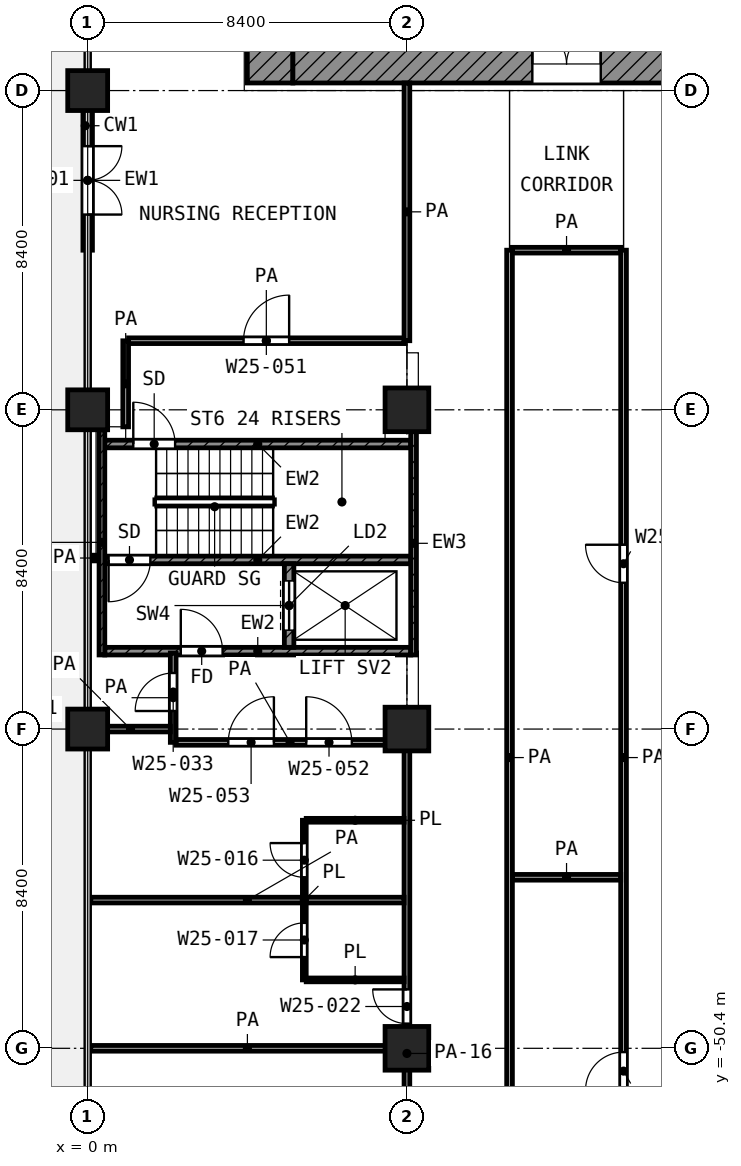
"""IFC4 building model, lengths in metres.
Left out: names, types, materials, properties, quantities, classifications, styles, units other than length and angle.
Written with IfcOpenShell. Run it as: python <this file> out.ifc"""

import sys

from ifc_helpers import new_model, si_unit, direction, frame, frame_2d, origin, origin_2d, place, context, subcontext, project, spatial, rectangle, extrude, element, fill, save


model = new_model("IFC4")
c1 = context("Model", 3, precision=1e-05, world=origin(), true_north=direction((0.0, 1.0)))
c2 = subcontext(c1, "Body", "Model", "MODEL_VIEW")
j1 = project(units=[si_unit("LENGTHUNIT", "METRE"), si_unit("PLANEANGLEUNIT", "RADIAN")], contexts=[c1])
p1 = place(None, origin())
s1 = spatial("IfcSite", under=j1, at=p1, CompositionType="ELEMENT")
p2 = place(p1, origin())
s2 = spatial("IfcBuilding", under=s1, at=p2, CompositionType="ELEMENT")
p3 = place(p2, frame((0.0, 0.0, 111.4)))
s3 = spatial("IfcBuildingStorey", under=s2, at=p3, CompositionType="ELEMENT", Elevation=111.4)
for number, where, z_axis, x_axis in (
    (1, (0.0, -25.2, 0.0), (0.0, 0.0, 1.0), (1.0, 0.0, 0.0)),
    (2, (0.0, -33.6, 0.0), (0.0, 0.0, 1.0), (1.0, 0.0, 0.0)),
):
    element("IfcColumn", number, at=place(p3, frame(where, z_axis=z_axis, x_axis=x_axis)), inside=s3, PredefinedType="COLUMN", context=c2, shape_type="SweptSolid", body=[
        extrude(rectangle(XDim=1.05, YDim=1.05, at=origin_2d()), origin(), (0.0, 0.0, 1.0), 4.2),
    ])
p4 = place(p3, frame((8.4, -33.6, 0.0), z_axis=(0.0, 0.0, 1.0), x_axis=(1.0, 0.0, 0.0)))
e3 = element("IfcColumn", 3, at=p4, inside=s3, PredefinedType="COLUMN", context=c2, shape_type="SweptSolid", body=[
    extrude(rectangle(XDim=1.15, YDim=1.15, at=origin_2d()), origin(), (0.0, 0.0, 1.0), 4.2),
])
p5 = place(p3, frame((0.0, -42.0, 0.0), z_axis=(0.0, 0.0, 1.0), x_axis=(1.0, 0.0, 0.0)))
e4 = element("IfcColumn", 4, at=p5, inside=s3, PredefinedType="COLUMN", context=c2, shape_type="SweptSolid", body=[
    extrude(rectangle(XDim=1.05, YDim=1.05, at=origin_2d()), origin(), (0.0, 0.0, 1.0), 4.2),
])
for number, where, z_axis, x_axis in (
    (5, (8.4, -42.0, 0.0), (0.0, 0.0, 1.0), (1.0, 0.0, 0.0)),
    (6, (8.4, -50.4, 0.0), (0.0, 0.0, 1.0), (1.0, 0.0, 0.0)),
):
    element("IfcColumn", number, at=place(p3, frame(where, z_axis=z_axis, x_axis=x_axis)), inside=s3, PredefinedType="COLUMN", context=c2, shape_type="SweptSolid", body=[
        extrude(rectangle(XDim=1.15, YDim=1.15, at=origin_2d()), origin(), (0.0, 0.0, 1.0), 4.2),
    ])
p6 = place(p3, frame((0.0, -25.725, 0.0), z_axis=(0.0, 0.0, 1.0), x_axis=(0.0, -1.0, 0.0)))
e7 = element("IfcWall", 7, at=p6, inside=s3, PredefinedType="SOLIDWALL", context=c2, shape_type="SweptSolid", body=[
    extrude(rectangle(XDim=3.675, YDim=0.25, at=frame_2d((1.837, 0.0))), origin(), (0.0, 0.0, 1.0), 3.48),
])
p7 = place(p6, frame((0.938, 0.0, 0.0)))
e8 = element("IfcOpeningElement", 8, at=p7, cuts=e7, PredefinedType="OPENING", context=c2, shape_type="SweptSolid", body=[
    extrude(rectangle(XDim=1.8, YDim=2.1, at=frame_2d((0.9, 1.05))), frame((0.0, 0.135, 0.0), z_axis=(0.0, -1.0, 0.0), x_axis=(1.0, 0.0, 0.0)), (0.0, 0.0, 1.0), 0.27),
])
p8 = place(p3, frame((4.8, -25.0, 0.0), z_axis=(0.0, 0.0, 1.0), x_axis=(0.0, 1.0, 0.0)))
e9 = element("IfcWall", 9, at=p8, inside=s3, PredefinedType="SHEAR", context=c2, shape_type="SweptSolid", body=[
    extrude(rectangle(XDim=19.6, YDim=1.2, at=frame_2d((9.8, 0.0))), origin(), (0.0, 0.0, 1.0), 3.6),
])
p9 = place(p8, frame((11.45, 0.0, 0.0)))
e10 = element("IfcOpeningElement", 10, at=p9, cuts=e9, PredefinedType="OPENING", context=c2, shape_type="SweptSolid", body=[
    extrude(rectangle(XDim=1.1, YDim=2.1, at=frame_2d((0.55, 1.05))), frame((0.0, 0.61, 0.0), z_axis=(0.0, -1.0, 0.0), x_axis=(1.0, 0.0, 0.0)), (0.0, 0.0, 1.0), 1.22),
])
p10 = place(p8, frame((2.15, 0.0, 0.0)))
e11 = element("IfcOpeningElement", 11, at=p10, cuts=e9, PredefinedType="OPENING", context=c2, shape_type="SweptSolid", body=[
    extrude(rectangle(XDim=1.1, YDim=2.1, at=frame_2d((0.55, 1.05))), frame((0.0, 0.61, 0.0), z_axis=(0.0, -1.0, 0.0), x_axis=(1.0, 0.0, 0.0)), (0.0, 0.0, 1.0), 1.22),
])
p11 = place(p3, frame((5.4, -24.5, 0.0), z_axis=(0.0, 0.0, 1.0), x_axis=(1.0, 0.0, 0.0)))
e12 = element("IfcWall", 12, at=p11, inside=s3, PredefinedType="SHEAR", context=c2, shape_type="SweptSolid", body=[
    extrude(rectangle(XDim=18.6, YDim=1.0, at=frame_2d((9.3, 0.0))), origin(), (0.0, 0.0, 1.0), 3.6),
])
p12 = place(p11, frame((6.3, 0.0, 0.0)))
e13 = element("IfcOpeningElement", 13, at=p12, cuts=e12, PredefinedType="OPENING", context=c2, shape_type="SweptSolid", body=[
    extrude(rectangle(XDim=1.8, YDim=2.1, at=frame_2d((0.9, 1.05))), frame((0.0, 0.51, 0.0), z_axis=(0.0, -1.0, 0.0), x_axis=(1.0, 0.0, 0.0)), (0.0, 0.0, 1.0), 1.02),
])
p13 = place(p3, frame((0.375, -40.05, 0.0), z_axis=(0.0, 0.0, 1.0), x_axis=(0.0, 1.0, 0.0)))
e14 = element("IfcWall", 14, at=p13, inside=s3, PredefinedType="SHEAR", context=c2, shape_type="SweptSolid", body=[
    extrude(rectangle(XDim=5.925, YDim=0.15, at=frame_2d((2.962, 0.0))), origin(), (0.0, 0.0, 1.0), 3.6),
])
p14 = place(p3, frame((8.575, -40.05, 0.0), z_axis=(0.0, 0.0, 1.0), x_axis=(0.0, 1.0, 0.0)))
e15 = element("IfcWall", 15, at=p14, inside=s3, PredefinedType="SHEAR", context=c2, shape_type="SweptSolid", body=[
    extrude(rectangle(XDim=5.875, YDim=0.15, at=frame_2d((2.938, 0.0))), origin(), (0.0, 0.0, 1.0), 3.6),
])
p15 = place(p3, frame((0.45, -34.5, 0.0), z_axis=(0.0, 0.0, 1.0), x_axis=(1.0, 0.0, 0.0)))
e16 = element("IfcWall", 16, at=p15, inside=s3, PredefinedType="SHEAR", context=c2, shape_type="SweptSolid", body=[
    extrude(rectangle(XDim=8.05, YDim=0.2, at=frame_2d((4.025, 0.0))), origin(), (0.0, 0.0, 1.0), 3.6),
])
p16 = place(p15, frame((0.75, 0.0, 0.0)))
e17 = element("IfcOpeningElement", 17, at=p16, cuts=e16, PredefinedType="OPENING", context=c2, shape_type="SweptSolid", body=[
    extrude(rectangle(XDim=1.1, YDim=2.1, at=frame_2d((0.55, 1.05))), frame((0.0, 0.11, 0.0), z_axis=(0.0, -1.0, 0.0), x_axis=(1.0, 0.0, 0.0)), (0.0, 0.0, 1.0), 0.22),
])
p17 = place(p3, frame((0.45, -37.55, 0.0), z_axis=(0.0, 0.0, 1.0), x_axis=(1.0, 0.0, 0.0)))
e18 = element("IfcWall", 18, at=p17, inside=s3, PredefinedType="SHEAR", context=c2, shape_type="SweptSolid", body=[
    extrude(rectangle(XDim=8.05, YDim=0.2, at=frame_2d((4.025, 0.0))), origin(), (0.0, 0.0, 1.0), 3.6),
])
p18 = place(p17, frame((0.1, 0.0, 0.0)))
e19 = element("IfcOpeningElement", 19, at=p18, cuts=e18, PredefinedType="OPENING", context=c2, shape_type="SweptSolid", body=[
    extrude(rectangle(XDim=1.1, YDim=2.1, at=frame_2d((0.55, 1.05))), frame((0.0, 0.11, 0.0), z_axis=(0.0, -1.0, 0.0), x_axis=(1.0, 0.0, 0.0)), (0.0, 0.0, 1.0), 0.22),
])
p19 = place(p3, frame((0.45, -39.95, 0.0), z_axis=(0.0, 0.0, 1.0), x_axis=(1.0, 0.0, 0.0)))
e20 = element("IfcWall", 20, at=p19, inside=s3, PredefinedType="SHEAR", context=c2, shape_type="SweptSolid", body=[
    extrude(rectangle(XDim=8.05, YDim=0.2, at=frame_2d((4.025, 0.0))), origin(), (0.0, 0.0, 1.0), 3.6),
])
p20 = place(p19, frame((2.0, 0.0, 0.0)))
e21 = element("IfcOpeningElement", 21, at=p20, cuts=e20, PredefinedType="OPENING", context=c2, shape_type="SweptSolid", body=[
    extrude(rectangle(XDim=1.1, YDim=2.1, at=frame_2d((0.55, 1.05))), frame((0.0, 0.11, 0.0), z_axis=(0.0, -1.0, 0.0), x_axis=(1.0, 0.0, 0.0)), (0.0, 0.0, 1.0), 0.22),
])
p21 = place(p3, frame((5.3, -39.85, 0.0), z_axis=(0.0, 0.0, 1.0), x_axis=(0.0, 1.0, 0.0)))
e22 = element("IfcWall", 22, at=p21, inside=s3, PredefinedType="SHEAR", context=c2, shape_type="SweptSolid", body=[
    extrude(rectangle(XDim=2.2, YDim=0.25, at=frame_2d((1.1, 0.0))), origin(), (0.0, 0.0, 1.0), 3.6),
])
p22 = place(p21, frame((0.45, 0.0, 0.0)))
e23 = element("IfcOpeningElement", 23, at=p22, cuts=e22, PredefinedType="OPENING", context=c2, shape_type="SweptSolid", body=[
    extrude(rectangle(XDim=1.3, YDim=2.1, at=frame_2d((0.65, 1.05))), frame((0.0, 0.135, 0.0), z_axis=(0.0, -1.0, 0.0), x_axis=(1.0, 0.0, 0.0)), (0.0, 0.0, 1.0), 0.27),
])
for number, where, z_axis, x_axis in (
    (24, (5.75, -48.6, 0.0), (0.0, 0.0, 1.0), (1.0, 0.0, 0.0)),
    (25, (5.75, -44.4, 0.0), (0.0, 0.0, 1.0), (1.0, 0.0, 0.0)),
):
    element("IfcWall", number, at=place(p3, frame(where, z_axis=z_axis, x_axis=x_axis)), inside=s3, PredefinedType="PARTITIONING", context=c2, shape_type="SweptSolid", body=[
        extrude(rectangle(XDim=2.575, YDim=0.1, at=frame_2d((1.288, 0.0))), origin(), (0.0, 0.0, 1.0), 3.6),
    ])
p23 = place(p3, frame((5.7, -48.6, 0.0), z_axis=(0.0, 0.0, 1.0), x_axis=(0.0, 1.0, 0.0)))
e26 = element("IfcWall", 26, at=p23, inside=s3, PredefinedType="PARTITIONING", context=c2, shape_type="SweptSolid", body=[
    extrude(rectangle(XDim=4.2, YDim=0.1, at=frame_2d((2.1, 0.0))), origin(), (0.0, 0.0, 1.0), 3.6),
])
p24 = place(p23, frame((2.7, 0.0, 0.0)))
e27 = element("IfcOpeningElement", 27, at=p24, cuts=e26, PredefinedType="OPENING", context=c2, shape_type="SweptSolid", body=[
    extrude(rectangle(XDim=0.9, YDim=2.1, at=frame_2d((0.45, 1.05))), frame((0.0, 0.06, 0.0), z_axis=(0.0, -1.0, 0.0), x_axis=(1.0, 0.0, 0.0)), (0.0, 0.0, 1.0), 0.12),
])
p25 = place(p23, frame((0.6, 0.0, 0.0)))
e28 = element("IfcOpeningElement", 28, at=p25, cuts=e26, PredefinedType="OPENING", context=c2, shape_type="SweptSolid", body=[
    extrude(rectangle(XDim=0.9, YDim=2.1, at=frame_2d((0.45, 1.05))), frame((0.0, 0.06, 0.0), z_axis=(0.0, -1.0, 0.0), x_axis=(1.0, 0.0, 0.0)), (0.0, 0.0, 1.0), 0.12),
])
for number, where, z_axis, x_axis in (
    (29, (0.08, -50.4, 0.0), (0.0, 0.0, 1.0), (1.0, 0.0, 0.0)),
    (30, (0.08, -46.5, 0.0), (0.0, 0.0, 1.0), (1.0, 0.0, 0.0)),
):
    element("IfcWall", number, at=place(p3, frame(where, z_axis=z_axis, x_axis=x_axis)), inside=s3, PredefinedType="PARTITIONING", context=c2, shape_type="SweptSolid", body=[
        extrude(rectangle(XDim=8.245, YDim=0.15, at=frame_2d((4.123, 0.0))), origin(), (0.0, 0.0, 1.0), 3.6),
    ])
p26 = place(p3, frame((11.175, -45.9, 0.0), z_axis=(0.0, 0.0, 1.0), x_axis=(1.0, 0.0, 0.0)))
e31 = element("IfcWall", 31, at=p26, inside=s3, PredefinedType="PARTITIONING", context=c2, shape_type="SweptSolid", body=[
    extrude(rectangle(XDim=2.85, YDim=0.15, at=frame_2d((1.425, 0.0))), origin(), (0.0, 0.0, 1.0), 3.6),
])
p27 = place(p3, frame((2.325, -42.35, 0.0), z_axis=(0.0, 0.0, 1.0), x_axis=(1.0, 0.0, 0.0)))
e32 = element("IfcWall", 32, at=p27, inside=s3, PredefinedType="PARTITIONING", context=c2, shape_type="SweptSolid", body=[
    extrude(rectangle(XDim=6.0, YDim=0.15, at=frame_2d((3.0, 0.0))), origin(), (0.0, 0.0, 1.0), 3.6),
])
p28 = place(p27, frame((3.425, 0.0, 0.0)))
e33 = element("IfcOpeningElement", 33, at=p28, cuts=e32, PredefinedType="OPENING", context=c2, shape_type="SweptSolid", body=[
    extrude(rectangle(XDim=1.2, YDim=2.1, at=frame_2d((0.6, 1.05))), frame((0.0, 0.085, 0.0), z_axis=(0.0, -1.0, 0.0), x_axis=(1.0, 0.0, 0.0)), (0.0, 0.0, 1.0), 0.17),
])
p29 = place(p27, frame((1.375, 0.0, 0.0)))
e34 = element("IfcOpeningElement", 34, at=p29, cuts=e32, PredefinedType="OPENING", context=c2, shape_type="SweptSolid", body=[
    extrude(rectangle(XDim=1.2, YDim=2.1, at=frame_2d((0.6, 1.05))), frame((0.0, 0.085, 0.0), z_axis=(0.0, -1.0, 0.0), x_axis=(1.0, 0.0, 0.0)), (0.0, 0.0, 1.0), 0.17),
])
p30 = place(p3, frame((0.08, -42.0, 0.0), z_axis=(0.0, 0.0, 1.0), x_axis=(1.0, 0.0, 0.0)))
e35 = element("IfcWall", 35, at=p30, inside=s3, PredefinedType="PARTITIONING", context=c2, shape_type="SweptSolid", body=[
    extrude(rectangle(XDim=2.095, YDim=0.15, at=frame_2d((1.047, 0.0))), origin(), (0.0, 0.0, 1.0), 3.6),
])
p31 = place(p3, frame((0.08, -37.5, 0.0), z_axis=(0.0, 0.0, 1.0), x_axis=(1.0, 0.0, 0.0)))
e36 = element("IfcWall", 36, at=p31, inside=s3, PredefinedType="PARTITIONING", context=c2, shape_type="SweptSolid", body=[
    extrude(rectangle(XDim=0.19, YDim=0.15, at=frame_2d((0.095, 0.0))), origin(), (0.0, 0.0, 1.0), 3.6),
])
p32 = place(p3, frame((1.076, -31.782, 0.0), z_axis=(0.0, 0.0, 1.0), x_axis=(1.0, 0.0, 0.0)))
e37 = element("IfcWall", 37, at=p32, inside=s3, PredefinedType="PARTITIONING", context=c2, shape_type="SweptSolid", body=[
    extrude(rectangle(XDim=7.249, YDim=0.15, at=frame_2d((3.625, 0.0))), origin(), (0.0, 0.0, 1.0), 3.6),
])
p33 = place(p32, frame((3.025, 0.0, 0.0)))
e38 = element("IfcOpeningElement", 38, at=p33, cuts=e37, PredefinedType="OPENING", context=c2, shape_type="SweptSolid", body=[
    extrude(rectangle(XDim=1.2, YDim=2.1, at=frame_2d((0.6, 1.05))), frame((0.0, 0.085, 0.0), z_axis=(0.0, -1.0, 0.0), x_axis=(1.0, 0.0, 0.0)), (0.0, 0.0, 1.0), 0.17),
])
p34 = place(p3, frame((11.175, -29.4, 0.0), z_axis=(0.0, 0.0, 1.0), x_axis=(1.0, 0.0, 0.0)))
e39 = element("IfcWall", 39, at=p34, inside=s3, PredefinedType="PARTITIONING", context=c2, shape_type="SweptSolid", body=[
    extrude(rectangle(XDim=2.85, YDim=0.15, at=frame_2d((1.425, 0.0))), origin(), (0.0, 0.0, 1.0), 3.6),
])
p35 = place(p3, frame((1.0, -34.048, 0.0), z_axis=(0.0, 0.0, 1.0), x_axis=(0.0, 1.0, 0.0)))
e40 = element("IfcWall", 40, at=p35, inside=s3, PredefinedType="PARTITIONING", context=c2, shape_type="SweptSolid", body=[
    extrude(rectangle(XDim=2.264, YDim=0.15, at=frame_2d((1.132, 0.0))), origin(), (0.0, 0.0, 1.0), 3.6),
])
p36 = place(p3, frame((2.25, -42.35, 0.0), z_axis=(0.0, 0.0, 1.0), x_axis=(0.0, 1.0, 0.0)))
e41 = element("IfcWall", 41, at=p36, inside=s3, PredefinedType="PARTITIONING", context=c2, shape_type="SweptSolid", body=[
    extrude(rectangle(XDim=2.35, YDim=0.15, at=frame_2d((1.175, 0.0))), origin(), (0.0, 0.0, 1.0), 3.6),
])
p37 = place(p36, frame((0.825, 0.0, 0.0)))
e42 = element("IfcOpeningElement", 42, at=p37, cuts=e41, PredefinedType="OPENING", context=c2, shape_type="SweptSolid", body=[
    extrude(rectangle(XDim=1.0, YDim=2.1, at=frame_2d((0.5, 1.05))), frame((0.0, 0.085, 0.0), z_axis=(0.0, -1.0, 0.0), x_axis=(1.0, 0.0, 0.0)), (0.0, 0.0, 1.0), 0.17),
])
p38 = place(p3, frame((8.4, -58.72, 0.0), z_axis=(0.0, 0.0, 1.0), x_axis=(0.0, 1.0, 0.0)))
e43 = element("IfcWall", 43, at=p38, inside=s3, PredefinedType="PARTITIONING", context=c2, shape_type="SweptSolid", body=[
    extrude(rectangle(XDim=16.37, YDim=0.15, at=frame_2d((8.185, 0.0))), origin(), (0.0, 0.0, 1.0), 2.7),
])
p39 = place(p38, frame((8.97, 0.0, 0.0)))
e44 = element("IfcOpeningElement", 44, at=p39, cuts=e43, PredefinedType="OPENING", context=c2, shape_type="SweptSolid", body=[
    extrude(rectangle(XDim=0.9, YDim=2.1, at=frame_2d((0.45, 1.05))), frame((0.0, 0.085, 0.0), z_axis=(0.0, -1.0, 0.0), x_axis=(1.0, 0.0, 0.0)), (0.0, 0.0, 1.0), 0.17),
])
p40 = place(p38, frame((3.37, 0.0, 0.0)))
e45 = element("IfcOpeningElement", 45, at=p40, cuts=e43, PredefinedType="OPENING", context=c2, shape_type="SweptSolid", body=[
    extrude(rectangle(XDim=1.5, YDim=2.1, at=frame_2d((0.75, 1.05))), frame((0.0, 0.085, 0.0), z_axis=(0.0, -1.0, 0.0), x_axis=(1.0, 0.0, 0.0)), (0.0, 0.0, 1.0), 0.17),
])
p41 = place(p3, frame((8.4, -31.782, 0.0), z_axis=(0.0, 0.0, 1.0), x_axis=(0.0, 1.0, 0.0)))
e46 = element("IfcWall", 46, at=p41, inside=s3, PredefinedType="PARTITIONING", context=c2, shape_type="SweptSolid", body=[
    extrude(rectangle(XDim=6.782, YDim=0.15, at=frame_2d((3.391, 0.0))), origin(), (0.0, 0.0, 1.0), 3.6),
])
p42 = place(p3, frame((11.1, -56.1, 0.0), z_axis=(0.0, 0.0, 1.0), x_axis=(0.0, 1.0, 0.0)))
e47 = element("IfcWall", 47, at=p42, inside=s3, PredefinedType="PARTITIONING", context=c2, shape_type="SweptSolid", body=[
    extrude(rectangle(XDim=26.7, YDim=0.15, at=frame_2d((13.35, 0.0))), origin(), (0.0, 0.0, 1.0), 3.6),
])
p43 = place(p3, frame((14.1, -56.1, 0.0), z_axis=(0.0, 0.0, 1.0), x_axis=(0.0, 1.0, 0.0)))
e48 = element("IfcWall", 48, at=p43, inside=s3, PredefinedType="PARTITIONING", context=c2, shape_type="SweptSolid", body=[
    extrude(rectangle(XDim=26.7, YDim=0.15, at=frame_2d((13.35, 0.0))), origin(), (0.0, 0.0, 1.0), 3.6),
])
p44 = place(p43, frame((17.95, 0.0, 0.0)))
e49 = element("IfcOpeningElement", 49, at=p44, cuts=e48, PredefinedType="OPENING", context=c2, shape_type="SweptSolid", body=[
    extrude(rectangle(XDim=1.0, YDim=2.1, at=frame_2d((0.5, 1.05))), frame((0.0, 0.085, 0.0), z_axis=(0.0, -1.0, 0.0), x_axis=(1.0, 0.0, 0.0)), (0.0, 0.0, 1.0), 0.17),
])
p45 = place(p43, frame((4.6, 0.0, 0.0)))
e50 = element("IfcOpeningElement", 50, at=p45, cuts=e48, PredefinedType="OPENING", context=c2, shape_type="SweptSolid", body=[
    extrude(rectangle(XDim=1.0, YDim=2.1, at=frame_2d((0.5, 1.05))), frame((0.0, 0.085, 0.0), z_axis=(0.0, -1.0, 0.0), x_axis=(1.0, 0.0, 0.0)), (0.0, 0.0, 1.0), 0.17),
])
p46 = place(p7, origin())
e51 = element("IfcDoor", 51, at=p46, inside=s3, OperationType="DOUBLE_DOOR_SINGLE_SWING", PredefinedType="DOOR", context=c2, shape_type="SweptSolid", body=[
    extrude(rectangle(XDim=1.8, YDim=2.1, at=frame_2d((0.9, 1.05))), frame((0.0, 0.025, 0.0), z_axis=(0.0, -1.0, 0.0), x_axis=(1.0, 0.0, 0.0)), (0.0, 0.0, 1.0), 0.05),
])
fill(e8, e51)
p47 = place(p12, origin())
e52 = element("IfcDoor", 52, at=p47, inside=s3, OperationType="DOUBLE_DOOR_SINGLE_SWING", PredefinedType="DOOR", context=c2, shape_type="SweptSolid", body=[
    extrude(rectangle(XDim=1.8, YDim=2.1, at=frame_2d((0.9, 1.05))), frame((0.0, 0.025, 0.0), z_axis=(0.0, -1.0, 0.0), x_axis=(1.0, 0.0, 0.0)), (0.0, 0.0, 1.0), 0.05),
])
fill(e13, e52)
p48 = place(p16, origin())
e53 = element("IfcDoor", 53, at=p48, inside=s3, OperationType="SINGLE_SWING_LEFT", PredefinedType="DOOR", context=c2, shape_type="SweptSolid", body=[
    extrude(rectangle(XDim=1.1, YDim=2.1, at=frame_2d((0.55, 1.05))), frame((0.0, 0.025, 0.0), z_axis=(0.0, -1.0, 0.0), x_axis=(1.0, 0.0, 0.0)), (0.0, 0.0, 1.0), 0.05),
])
fill(e17, e53)
p49 = place(p18, frame((1.1, 0.0, 0.0), z_axis=(0.0, 0.0, 1.0), x_axis=(-1.0, 0.0, 0.0)))
e54 = element("IfcDoor", 54, at=p49, inside=s3, OperationType="SINGLE_SWING_LEFT", PredefinedType="DOOR", context=c2, shape_type="SweptSolid", body=[
    extrude(rectangle(XDim=1.1, YDim=2.1, at=frame_2d((0.55, 1.05))), frame((0.0, 0.025, 0.0), z_axis=(0.0, -1.0, 0.0), x_axis=(1.0, 0.0, 0.0)), (0.0, 0.0, 1.0), 0.05),
])
fill(e19, e54)
p50 = place(p22, origin())
e55 = element("IfcDoor", 55, at=p50, inside=s3, OperationType="DOUBLE_DOOR_SLIDING", PredefinedType="DOOR", context=c2, shape_type="SweptSolid", body=[
    extrude(rectangle(XDim=1.3, YDim=2.1, at=frame_2d((0.65, 1.05))), frame((0.0, 0.025, 0.0), z_axis=(0.0, -1.0, 0.0), x_axis=(1.0, 0.0, 0.0)), (0.0, 0.0, 1.0), 0.05),
])
fill(e23, e55)
p51 = place(p20, origin())
e56 = element("IfcDoor", 56, at=p51, inside=s3, OperationType="SINGLE_SWING_LEFT", PredefinedType="DOOR", context=c2, shape_type="SweptSolid", body=[
    extrude(rectangle(XDim=1.1, YDim=2.1, at=frame_2d((0.55, 1.05))), frame((0.0, 0.025, 0.0), z_axis=(0.0, -1.0, 0.0), x_axis=(1.0, 0.0, 0.0)), (0.0, 0.0, 1.0), 0.05),
])
fill(e21, e56)
p52 = place(p33, origin())
e57 = element("IfcDoor", 57, at=p52, inside=s3, OperationType="SINGLE_SWING_RIGHT", PredefinedType="DOOR", context=c2, shape_type="SweptSolid", body=[
    extrude(rectangle(XDim=1.2, YDim=2.1, at=frame_2d((0.6, 1.05))), frame((0.0, 0.025, 0.0), z_axis=(0.0, -1.0, 0.0), x_axis=(1.0, 0.0, 0.0)), (0.0, 0.0, 1.0), 0.05),
])
fill(e38, e57)
p53 = place(p37, origin())
e58 = element("IfcDoor", 58, at=p53, inside=s3, OperationType="SINGLE_SWING_LEFT", PredefinedType="DOOR", context=c2, shape_type="SweptSolid", body=[
    extrude(rectangle(XDim=1.0, YDim=2.1, at=frame_2d((0.5, 1.05))), frame((0.0, 0.025, 0.0), z_axis=(0.0, -1.0, 0.0), x_axis=(1.0, 0.0, 0.0)), (0.0, 0.0, 1.0), 0.05),
])
fill(e42, e58)
p54 = place(p28, origin())
e59 = element("IfcDoor", 59, at=p54, inside=s3, OperationType="SINGLE_SWING_LEFT", PredefinedType="DOOR", context=c2, shape_type="SweptSolid", body=[
    extrude(rectangle(XDim=1.2, YDim=2.1, at=frame_2d((0.6, 1.05))), frame((0.0, 0.025, 0.0), z_axis=(0.0, -1.0, 0.0), x_axis=(1.0, 0.0, 0.0)), (0.0, 0.0, 1.0), 0.05),
])
fill(e33, e59)
p55 = place(p29, origin())
e60 = element("IfcDoor", 60, at=p55, inside=s3, OperationType="SINGLE_SWING_RIGHT", PredefinedType="DOOR", context=c2, shape_type="SweptSolid", body=[
    extrude(rectangle(XDim=1.2, YDim=2.1, at=frame_2d((0.6, 1.05))), frame((0.0, 0.025, 0.0), z_axis=(0.0, -1.0, 0.0), x_axis=(1.0, 0.0, 0.0)), (0.0, 0.0, 1.0), 0.05),
])
fill(e34, e60)
p56 = place(p24, origin())
e61 = element("IfcDoor", 61, at=p56, inside=s3, OperationType="SINGLE_SWING_RIGHT", PredefinedType="DOOR", context=c2, shape_type="SweptSolid", body=[
    extrude(rectangle(XDim=0.9, YDim=2.1, at=frame_2d((0.45, 1.05))), frame((0.0, 0.025, 0.0), z_axis=(0.0, -1.0, 0.0), x_axis=(1.0, 0.0, 0.0)), (0.0, 0.0, 1.0), 0.05),
])
fill(e27, e61)
p57 = place(p39, origin())
e62 = element("IfcDoor", 62, at=p57, inside=s3, OperationType="SINGLE_SWING_RIGHT", PredefinedType="DOOR", context=c2, shape_type="SweptSolid", body=[
    extrude(rectangle(XDim=0.9, YDim=2.1, at=frame_2d((0.45, 1.05))), frame((0.0, 0.025, 0.0), z_axis=(0.0, -1.0, 0.0), x_axis=(1.0, 0.0, 0.0)), (0.0, 0.0, 1.0), 0.05),
])
fill(e44, e62)
p58 = place(p25, origin())
e63 = element("IfcDoor", 63, at=p58, inside=s3, OperationType="SINGLE_SWING_LEFT", PredefinedType="DOOR", context=c2, shape_type="SweptSolid", body=[
    extrude(rectangle(XDim=0.9, YDim=2.1, at=frame_2d((0.45, 1.05))), frame((0.0, 0.025, 0.0), z_axis=(0.0, -1.0, 0.0), x_axis=(1.0, 0.0, 0.0)), (0.0, 0.0, 1.0), 0.05),
])
fill(e28, e63)
p59 = place(p44, origin())
e64 = element("IfcDoor", 64, at=p59, inside=s3, OperationType="SINGLE_SWING_RIGHT", PredefinedType="DOOR", context=c2, shape_type="SweptSolid", body=[
    extrude(rectangle(XDim=1.0, YDim=2.1, at=frame_2d((0.5, 1.05))), frame((0.0, 0.025, 0.0), z_axis=(0.0, -1.0, 0.0), x_axis=(1.0, 0.0, 0.0)), (0.0, 0.0, 1.0), 0.05),
])
fill(e49, e64)
p60 = place(p45, origin())
e65 = element("IfcDoor", 65, at=p60, inside=s3, OperationType="SINGLE_SWING_LEFT", PredefinedType="DOOR", context=c2, shape_type="SweptSolid", body=[
    extrude(rectangle(XDim=1.0, YDim=2.1, at=frame_2d((0.5, 1.05))), frame((0.0, 0.025, 0.0), z_axis=(0.0, -1.0, 0.0), x_axis=(1.0, 0.0, 0.0)), (0.0, 0.0, 1.0), 0.05),
])
fill(e50, e65)
save(model, sys.argv[1])
